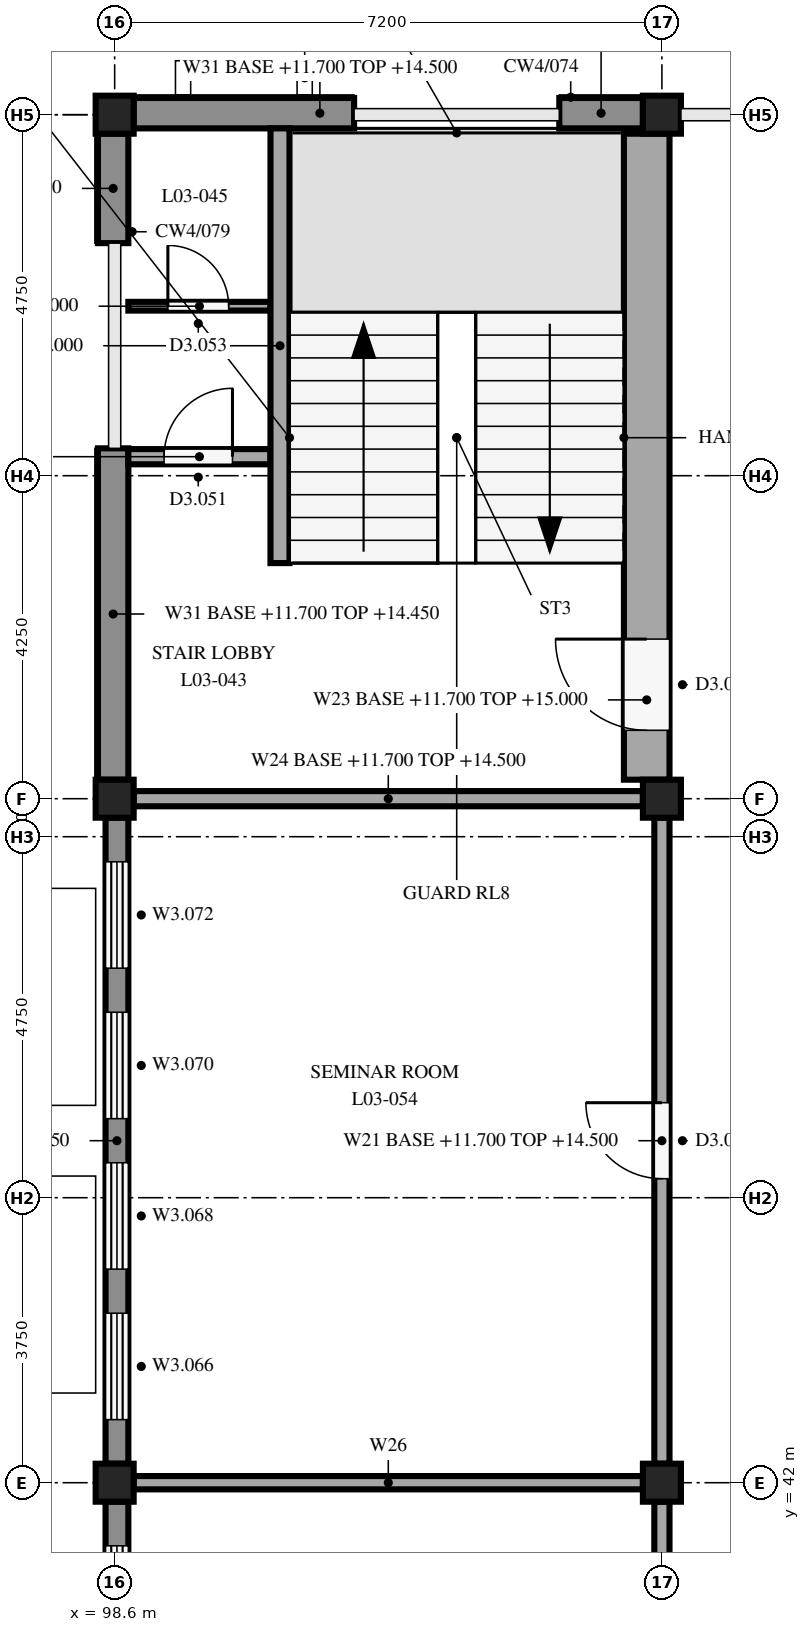
"""IFC4 building model, lengths in metres.
Left out: names, types, materials, properties, quantities, classifications, styles, units other than length and angle.
Written with IfcOpenShell. Run it as: python <this file> out.ifc"""

import sys

from ifc_helpers import new_model, si_unit, direction, frame, frame_2d, origin, origin_2d, place, context, subcontext, project, spatial, rectangle, extrude, element, fill, save


model = new_model("IFC4")
c1 = context("Model", 3, precision=1e-05, world=origin(), true_north=direction((0.0, 1.0)))
c2 = subcontext(c1, "Body", "Model", "MODEL_VIEW")
j1 = project(units=[si_unit("LENGTHUNIT", "METRE"), si_unit("PLANEANGLEUNIT", "RADIAN")], contexts=[c1])
p1 = place(None, origin())
s1 = spatial("IfcSite", under=j1, at=p1, CompositionType="ELEMENT")
p2 = place(p1, origin())
s2 = spatial("IfcBuilding", under=s1, at=p2, CompositionType="ELEMENT")
p3 = place(p2, frame((0.0, 0.0, 11.7)))
s3 = spatial("IfcBuildingStorey", under=s2, at=p3, CompositionType="ELEMENT", Elevation=11.7)
for number, where, z_axis, x_axis in (
    (1, (98.6, 42.0, 0.0), (0.0, 0.0, 1.0), (1.0, 0.0, 0.0)),
    (2, (98.6, 51.0, 0.0), (0.0, 0.0, 1.0), (1.0, 0.0, 0.0)),
    (3, (98.6, 60.0, 0.0), (0.0, 0.0, 1.0), (1.0, 0.0, 0.0)),
    (4, (105.8, 42.0, 0.0), (0.0, 0.0, 1.0), (1.0, 0.0, 0.0)),
    (5, (105.8, 51.0, 0.0), (0.0, 0.0, 1.0), (1.0, 0.0, 0.0)),
    (6, (105.8, 60.0, 0.0), (0.0, 0.0, 1.0), (1.0, 0.0, 0.0)),
):
    element("IfcColumn", number, at=place(p3, frame(where, z_axis=z_axis, x_axis=x_axis)), inside=s3, PredefinedType="COLUMN", context=c2, shape_type="SweptSolid", body=[
        extrude(rectangle(XDim=0.5, YDim=0.5, at=origin_2d()), origin(), (0.0, 0.0, 1.0), 3.3),
    ])
p4 = place(p3, frame((98.63, 33.25, 0.0), z_axis=(0.0, 0.0, 1.0), x_axis=(0.0, 1.0, 0.0)))
e7 = element("IfcWall", 7, at=p4, inside=s3, PredefinedType="STANDARD", context=c2, shape_type="SweptSolid", body=[
    extrude(rectangle(XDim=8.5, YDim=0.3, at=frame_2d((4.25, 0.0))), origin(), (0.0, 0.0, 1.0), 2.75),
])
p5 = place(p4, frame((0.58, 0.0, 0.6)))
e8 = element("IfcOpeningElement", 8, at=p5, cuts=e7, PredefinedType="OPENING", context=c2, shape_type="SweptSolid", body=[
    extrude(rectangle(XDim=1.4, YDim=2.1, at=frame_2d((0.7, 1.05))), frame((0.0, 0.16, 0.0), z_axis=(0.0, -1.0, 0.0), x_axis=(1.0, 0.0, 0.0)), (0.0, 0.0, 1.0), 0.32),
])
p6 = place(p4, frame((2.56, 0.0, 0.6)))
e9 = element("IfcOpeningElement", 9, at=p6, cuts=e7, PredefinedType="OPENING", context=c2, shape_type="SweptSolid", body=[
    extrude(rectangle(XDim=1.4, YDim=2.1, at=frame_2d((0.7, 1.05))), frame((0.0, 0.16, 0.0), z_axis=(0.0, -1.0, 0.0), x_axis=(1.0, 0.0, 0.0)), (0.0, 0.0, 1.0), 0.32),
])
p7 = place(p4, frame((4.54, 0.0, 0.6)))
e10 = element("IfcOpeningElement", 10, at=p7, cuts=e7, PredefinedType="OPENING", context=c2, shape_type="SweptSolid", body=[
    extrude(rectangle(XDim=1.4, YDim=2.1, at=frame_2d((0.7, 1.05))), frame((0.0, 0.16, 0.0), z_axis=(0.0, -1.0, 0.0), x_axis=(1.0, 0.0, 0.0)), (0.0, 0.0, 1.0), 0.32),
])
p8 = place(p4, frame((6.52, 0.0, 0.6)))
e11 = element("IfcOpeningElement", 11, at=p8, cuts=e7, PredefinedType="OPENING", context=c2, shape_type="SweptSolid", body=[
    extrude(rectangle(XDim=1.4, YDim=2.1, at=frame_2d((0.7, 1.05))), frame((0.0, 0.16, 0.0), z_axis=(0.0, -1.0, 0.0), x_axis=(1.0, 0.0, 0.0)), (0.0, 0.0, 1.0), 0.32),
])
p9 = place(p3, frame((98.63, 42.25, 0.0), z_axis=(0.0, 0.0, 1.0), x_axis=(0.0, 1.0, 0.0)))
e12 = element("IfcWall", 12, at=p9, inside=s3, PredefinedType="STANDARD", context=c2, shape_type="SweptSolid", body=[
    extrude(rectangle(XDim=8.5, YDim=0.3, at=frame_2d((4.25, 0.0))), origin(), (0.0, 0.0, 1.0), 2.75),
])
p10 = place(p9, frame((0.58, 0.0, 0.6)))
e13 = element("IfcOpeningElement", 13, at=p10, cuts=e12, PredefinedType="OPENING", context=c2, shape_type="SweptSolid", body=[
    extrude(rectangle(XDim=1.4, YDim=2.1, at=frame_2d((0.7, 1.05))), frame((0.0, 0.16, 0.0), z_axis=(0.0, -1.0, 0.0), x_axis=(1.0, 0.0, 0.0)), (0.0, 0.0, 1.0), 0.32),
])
p11 = place(p9, frame((2.56, 0.0, 0.6)))
e14 = element("IfcOpeningElement", 14, at=p11, cuts=e12, PredefinedType="OPENING", context=c2, shape_type="SweptSolid", body=[
    extrude(rectangle(XDim=1.4, YDim=2.1, at=frame_2d((0.7, 1.05))), frame((0.0, 0.16, 0.0), z_axis=(0.0, -1.0, 0.0), x_axis=(1.0, 0.0, 0.0)), (0.0, 0.0, 1.0), 0.32),
])
p12 = place(p9, frame((4.54, 0.0, 0.6)))
e15 = element("IfcOpeningElement", 15, at=p12, cuts=e12, PredefinedType="OPENING", context=c2, shape_type="SweptSolid", body=[
    extrude(rectangle(XDim=1.4, YDim=2.1, at=frame_2d((0.7, 1.05))), frame((0.0, 0.16, 0.0), z_axis=(0.0, -1.0, 0.0), x_axis=(1.0, 0.0, 0.0)), (0.0, 0.0, 1.0), 0.32),
])
p13 = place(p9, frame((6.52, 0.0, 0.6)))
e16 = element("IfcOpeningElement", 16, at=p13, cuts=e12, PredefinedType="OPENING", context=c2, shape_type="SweptSolid", body=[
    extrude(rectangle(XDim=1.4, YDim=2.1, at=frame_2d((0.7, 1.05))), frame((0.0, 0.16, 0.0), z_axis=(0.0, -1.0, 0.0), x_axis=(1.0, 0.0, 0.0)), (0.0, 0.0, 1.0), 0.32),
])
p14 = place(p3, frame((98.58, 51.25, 0.0), z_axis=(0.0, 0.0, 1.0), x_axis=(0.0, 1.0, 0.0)))
e17 = element("IfcWall", 17, at=p14, inside=s3, PredefinedType="STANDARD", context=c2, shape_type="SweptSolid", body=[
    extrude(rectangle(XDim=4.36, YDim=0.4, at=frame_2d((2.18, 0.0))), origin(), (0.0, 0.0, 1.0), 2.75),
])
p15 = place(p3, frame((98.58, 58.31, 0.0), z_axis=(0.0, 0.0, 1.0), x_axis=(0.0, 1.0, 0.0)))
e18 = element("IfcWall", 18, at=p15, inside=s3, PredefinedType="STANDARD", context=c2, shape_type="SweptSolid", body=[
    extrude(rectangle(XDim=1.44, YDim=0.4, at=frame_2d((0.72, 0.0))), origin(), (0.0, 0.0, 1.0), 2.75),
])
p16 = place(p3, frame((98.85, 60.02, 0.0), z_axis=(0.0, 0.0, 1.0), x_axis=(1.0, 0.0, 0.0)))
e19 = element("IfcWall", 19, at=p16, inside=s3, PredefinedType="STANDARD", context=c2, shape_type="SweptSolid", body=[
    extrude(rectangle(XDim=2.9, YDim=0.4, at=frame_2d((1.45, 0.0))), origin(), (0.0, 0.0, 1.0), 2.8),
])
p17 = place(p3, frame((104.45, 60.02, 0.0), z_axis=(0.0, 0.0, 1.0), x_axis=(1.0, 0.0, 0.0)))
e20 = element("IfcWall", 20, at=p17, inside=s3, PredefinedType="STANDARD", context=c2, shape_type="SweptSolid", body=[
    extrude(rectangle(XDim=1.1, YDim=0.4, at=frame_2d((0.55, 0.0))), origin(), (0.0, 0.0, 1.0), 2.8),
])
p18 = place(p3, frame((100.775, 54.1, 0.0), z_axis=(0.0, 0.0, 1.0), x_axis=(0.0, 1.0, 0.0)))
e21 = element("IfcWall", 21, at=p18, inside=s3, PredefinedType="SOLIDWALL", context=c2, shape_type="SweptSolid", body=[
    extrude(rectangle(XDim=5.72, YDim=0.25, at=frame_2d((2.86, 0.0))), origin(), (0.0, 0.0, 1.0), 3.3),
])
p19 = place(p3, frame((105.6, 51.25, 0.0), z_axis=(0.0, 0.0, 1.0), x_axis=(0.0, 1.0, 0.0)))
e22 = element("IfcWall", 22, at=p19, inside=s3, PredefinedType="SOLIDWALL", context=c2, shape_type="SweptSolid", body=[
    extrude(rectangle(XDim=8.5, YDim=0.6, at=frame_2d((4.25, 0.0))), origin(), (0.0, 0.0, 1.0), 3.3),
])
p20 = place(p19, frame((0.65, 0.0, 0.0)))
e23 = element("IfcOpeningElement", 23, at=p20, cuts=e22, PredefinedType="OPENING", context=c2, shape_type="SweptSolid", body=[
    extrude(rectangle(XDim=1.2, YDim=2.1, at=frame_2d((0.6, 1.05))), frame((0.0, 0.31, 0.0), z_axis=(0.0, -1.0, 0.0), x_axis=(1.0, 0.0, 0.0)), (0.0, 0.0, 1.0), 0.62),
])
p21 = place(p3, frame((98.78, 55.5, 0.0), z_axis=(0.0, 0.0, 1.0), x_axis=(1.0, 0.0, 0.0)))
e24 = element("IfcWall", 24, at=p21, inside=s3, PredefinedType="SOLIDWALL", context=c2, shape_type="SweptSolid", body=[
    extrude(rectangle(XDim=1.87, YDim=0.2, at=frame_2d((0.935, 0.0))), origin(), (0.0, 0.0, 1.0), 3.3),
])
p22 = place(p21, frame((0.47, 0.0, 0.0)))
e25 = element("IfcOpeningElement", 25, at=p22, cuts=e24, PredefinedType="OPENING", context=c2, shape_type="SweptSolid", body=[
    extrude(rectangle(XDim=0.9, YDim=2.1, at=frame_2d((0.45, 1.05))), frame((0.0, 0.11, 0.0), z_axis=(0.0, -1.0, 0.0), x_axis=(1.0, 0.0, 0.0)), (0.0, 0.0, 1.0), 0.22),
])
p23 = place(p3, frame((98.78, 57.48, 0.0), z_axis=(0.0, 0.0, 1.0), x_axis=(1.0, 0.0, 0.0)))
e26 = element("IfcWall", 26, at=p23, inside=s3, PredefinedType="PARTITIONING", context=c2, shape_type="SweptSolid", body=[
    extrude(rectangle(XDim=1.87, YDim=0.115, at=frame_2d((0.935, 0.0))), origin(), (0.0, 0.0, 1.0), 3.3),
])
p24 = place(p23, frame((0.52, 0.0, 0.0)))
e27 = element("IfcOpeningElement", 27, at=p24, cuts=e26, PredefinedType="OPENING", context=c2, shape_type="SweptSolid", body=[
    extrude(rectangle(XDim=0.8, YDim=2.1, at=frame_2d((0.4, 1.05))), frame((0.0, 0.067, 0.0), z_axis=(0.0, -1.0, 0.0), x_axis=(1.0, 0.0, 0.0)), (0.0, 0.0, 1.0), 0.135),
])
p25 = place(p3, frame((98.85, 51.0, 0.0), z_axis=(0.0, 0.0, 1.0), x_axis=(1.0, 0.0, 0.0)))
e28 = element("IfcWall", 28, at=p25, inside=s3, PredefinedType="SOLIDWALL", context=c2, shape_type="SweptSolid", body=[
    extrude(rectangle(XDim=6.7, YDim=0.2, at=frame_2d((3.35, 0.0))), origin(), (0.0, 0.0, 1.0), 2.8),
])
p26 = place(p3, frame((105.8, 33.25, 0.0), z_axis=(0.0, 0.0, 1.0), x_axis=(0.0, 1.0, 0.0)))
e29 = element("IfcWall", 29, at=p26, inside=s3, PredefinedType="PARTITIONING", context=c2, shape_type="SweptSolid", body=[
    extrude(rectangle(XDim=8.5, YDim=0.2, at=frame_2d((4.25, 0.0))), origin(), (0.0, 0.0, 1.0), 2.8),
])
p27 = place(p26, frame((3.75, 0.0, 0.0)))
e30 = element("IfcOpeningElement", 30, at=p27, cuts=e29, PredefinedType="OPENING", context=c2, shape_type="SweptSolid", body=[
    extrude(rectangle(XDim=1.0, YDim=2.1, at=frame_2d((0.5, 1.05))), frame((0.0, 0.11, 0.0), z_axis=(0.0, -1.0, 0.0), x_axis=(1.0, 0.0, 0.0)), (0.0, 0.0, 1.0), 0.22),
])
p28 = place(p3, frame((105.8, 42.25, 0.0), z_axis=(0.0, 0.0, 1.0), x_axis=(0.0, 1.0, 0.0)))
e31 = element("IfcWall", 31, at=p28, inside=s3, PredefinedType="PARTITIONING", context=c2, shape_type="SweptSolid", body=[
    extrude(rectangle(XDim=8.5, YDim=0.2, at=frame_2d((4.25, 0.0))), origin(), (0.0, 0.0, 1.0), 2.8),
])
p29 = place(p28, frame((3.75, 0.0, 0.0)))
e32 = element("IfcOpeningElement", 32, at=p29, cuts=e31, PredefinedType="OPENING", context=c2, shape_type="SweptSolid", body=[
    extrude(rectangle(XDim=1.0, YDim=2.1, at=frame_2d((0.5, 1.05))), frame((0.0, 0.11, 0.0), z_axis=(0.0, -1.0, 0.0), x_axis=(1.0, 0.0, 0.0)), (0.0, 0.0, 1.0), 0.22),
])
p30 = place(p3, frame((98.85, 42.0, 0.0), z_axis=(0.0, 0.0, 1.0), x_axis=(1.0, 0.0, 0.0)))
e33 = element("IfcWall", 33, at=p30, inside=s3, PredefinedType="PARTITIONING", context=c2, shape_type="SweptSolid", body=[
    extrude(rectangle(XDim=6.7, YDim=0.175, at=frame_2d((3.35, 0.0))), origin(), (0.0, 0.0, 1.0), 2.8),
])
p31 = place(p8, origin())
e34 = element("IfcWindow", 34, at=p31, inside=s3, PartitioningType="DOUBLE_PANEL_VERTICAL", PredefinedType="WINDOW", context=c2, shape_type="SweptSolid", body=[
    extrude(rectangle(XDim=1.4, YDim=2.1, at=frame_2d((0.7, 1.05))), frame((0.0, 0.03, 0.0), z_axis=(0.0, -1.0, 0.0), x_axis=(1.0, 0.0, 0.0)), (0.0, 0.0, 1.0), 0.06),
])
fill(e11, e34)
p32 = place(p10, origin())
e35 = element("IfcWindow", 35, at=p32, inside=s3, PartitioningType="DOUBLE_PANEL_VERTICAL", PredefinedType="WINDOW", context=c2, shape_type="SweptSolid", body=[
    extrude(rectangle(XDim=1.4, YDim=2.1, at=frame_2d((0.7, 1.05))), frame((0.0, 0.03, 0.0), z_axis=(0.0, -1.0, 0.0), x_axis=(1.0, 0.0, 0.0)), (0.0, 0.0, 1.0), 0.06),
])
fill(e13, e35)
p33 = place(p11, origin())
e36 = element("IfcWindow", 36, at=p33, inside=s3, PartitioningType="DOUBLE_PANEL_VERTICAL", PredefinedType="WINDOW", context=c2, shape_type="SweptSolid", body=[
    extrude(rectangle(XDim=1.4, YDim=2.1, at=frame_2d((0.7, 1.05))), frame((0.0, 0.03, 0.0), z_axis=(0.0, -1.0, 0.0), x_axis=(1.0, 0.0, 0.0)), (0.0, 0.0, 1.0), 0.06),
])
fill(e14, e36)
p34 = place(p12, origin())
e37 = element("IfcWindow", 37, at=p34, inside=s3, PartitioningType="DOUBLE_PANEL_VERTICAL", PredefinedType="WINDOW", context=c2, shape_type="SweptSolid", body=[
    extrude(rectangle(XDim=1.4, YDim=2.1, at=frame_2d((0.7, 1.05))), frame((0.0, 0.03, 0.0), z_axis=(0.0, -1.0, 0.0), x_axis=(1.0, 0.0, 0.0)), (0.0, 0.0, 1.0), 0.06),
])
fill(e15, e37)
p35 = place(p13, origin())
e38 = element("IfcWindow", 38, at=p35, inside=s3, PartitioningType="DOUBLE_PANEL_VERTICAL", PredefinedType="WINDOW", context=c2, shape_type="SweptSolid", body=[
    extrude(rectangle(XDim=1.4, YDim=2.1, at=frame_2d((0.7, 1.05))), frame((0.0, 0.03, 0.0), z_axis=(0.0, -1.0, 0.0), x_axis=(1.0, 0.0, 0.0)), (0.0, 0.0, 1.0), 0.06),
])
fill(e16, e38)
p36 = place(p20, origin())
e39 = element("IfcDoor", 39, at=p36, inside=s3, OperationType="SINGLE_SWING_RIGHT", PredefinedType="DOOR", context=c2, shape_type="SweptSolid", body=[
    extrude(rectangle(XDim=1.2, YDim=2.1, at=frame_2d((0.6, 1.05))), frame((0.0, 0.025, 0.0), z_axis=(0.0, -1.0, 0.0), x_axis=(1.0, 0.0, 0.0)), (0.0, 0.0, 1.0), 0.05),
])
fill(e23, e39)
p37 = place(p22, origin())
e40 = element("IfcDoor", 40, at=p37, inside=s3, OperationType="SINGLE_SWING_RIGHT", PredefinedType="DOOR", context=c2, shape_type="SweptSolid", body=[
    extrude(rectangle(XDim=0.9, YDim=2.1, at=frame_2d((0.45, 1.05))), frame((0.0, 0.025, 0.0), z_axis=(0.0, -1.0, 0.0), x_axis=(1.0, 0.0, 0.0)), (0.0, 0.0, 1.0), 0.05),
])
fill(e25, e40)
p38 = place(p24, origin())
e41 = element("IfcDoor", 41, at=p38, inside=s3, OperationType="SINGLE_SWING_LEFT", PredefinedType="DOOR", context=c2, shape_type="SweptSolid", body=[
    extrude(rectangle(XDim=0.8, YDim=2.1, at=frame_2d((0.4, 1.05))), frame((0.0, 0.025, 0.0), z_axis=(0.0, -1.0, 0.0), x_axis=(1.0, 0.0, 0.0)), (0.0, 0.0, 1.0), 0.05),
])
fill(e27, e41)
p39 = place(p29, origin())
e42 = element("IfcDoor", 42, at=p39, inside=s3, OperationType="SINGLE_SWING_RIGHT", PredefinedType="DOOR", context=c2, shape_type="SweptSolid", body=[
    extrude(rectangle(XDim=1.0, YDim=2.1, at=frame_2d((0.5, 1.05))), frame((0.0, 0.025, 0.0), z_axis=(0.0, -1.0, 0.0), x_axis=(1.0, 0.0, 0.0)), (0.0, 0.0, 1.0), 0.05),
])
fill(e32, e42)
save(model, sys.argv[1])
